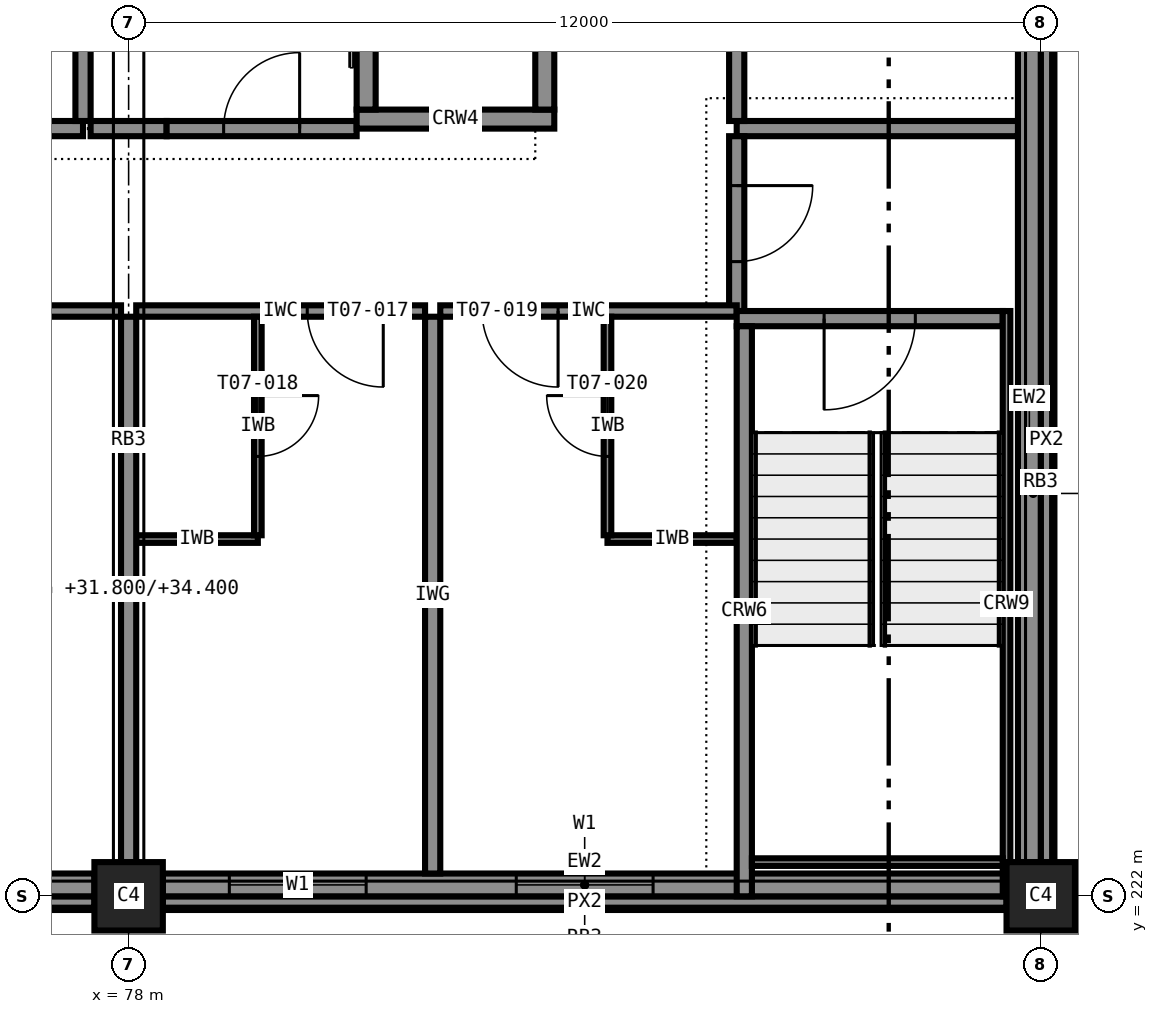
"""IFC4 building model, lengths in metres.
Left out: names, types, materials, properties, quantities, classifications, styles, units other than length and angle.
Written with IfcOpenShell. Run it as: python <this file> out.ifc"""

import sys

from ifc_helpers import new_model, si_unit, direction, frame, frame_2d, origin, origin_2d, place, context, subcontext, project, spatial, rectangle, extrude, element, fill, save


model = new_model("IFC4")
c1 = context("Model", 3, precision=1e-05, world=origin(), true_north=direction((0.0, 1.0)))
c2 = subcontext(c1, "Body", "Model", "MODEL_VIEW")
j1 = project(units=[si_unit("LENGTHUNIT", "METRE"), si_unit("PLANEANGLEUNIT", "RADIAN")], contexts=[c1])
p1 = place(None, origin())
s1 = spatial("IfcSite", under=j1, at=p1, CompositionType="ELEMENT")
p2 = place(p1, origin())
s2 = spatial("IfcBuilding", under=s1, at=p2, CompositionType="ELEMENT")
p3 = place(p2, frame((0.0, 0.0, 31.8)))
s3 = spatial("IfcBuildingStorey", under=s2, at=p3, CompositionType="ELEMENT", Elevation=31.8)
for number, where, z_axis, x_axis in (
    (1, (78.0, 222.0, 0.0), (0.0, 0.0, 1.0), (1.0, 0.0, 0.0)),
    (2, (90.0, 222.0, 0.0), (0.0, 0.0, 1.0), (1.0, 0.0, 0.0)),
):
    element("IfcColumn", number, at=place(p3, frame(where, z_axis=z_axis, x_axis=x_axis)), inside=s3, PredefinedType="COLUMN", context=c2, shape_type="SweptSolid", body=[
        extrude(rectangle(XDim=0.9, YDim=0.9, at=origin_2d()), origin(), (0.0, 0.0, 1.0), 3.6),
    ])
p4 = place(p3, frame((81.0, 232.225, 0.0), z_axis=(0.0, 0.0, 1.0), x_axis=(1.0, 0.0, 0.0)))
e3 = element("IfcWall", 3, at=p4, inside=s3, PredefinedType="SHEAR", context=c2, shape_type="SweptSolid", body=[
    extrude(rectangle(XDim=2.6, YDim=0.25, at=frame_2d((1.3, 0.0))), origin(), (0.0, 0.0, 1.0), 3.6),
])
p5 = place(p3, frame((81.125, 232.35, 0.0), z_axis=(0.0, 0.0, 1.0), x_axis=(0.0, 1.0, 0.0)))
e4 = element("IfcWall", 4, at=p5, inside=s3, PredefinedType="SHEAR", context=c2, shape_type="SweptSolid", body=[
    extrude(rectangle(XDim=3.3, YDim=0.25, at=frame_2d((1.65, 0.0))), origin(), (0.0, 0.0, 1.0), 3.6),
])
p6 = place(p5, frame((1.1, 0.0, 0.0)))
e5 = element("IfcOpeningElement", 5, at=p6, cuts=e4, PredefinedType="OPENING", context=c2, shape_type="SweptSolid", body=[
    extrude(rectangle(XDim=1.1, YDim=2.1, at=frame_2d((0.55, 1.05))), frame((0.0, 0.135, 0.0), z_axis=(0.0, -1.0, 0.0), x_axis=(1.0, 0.0, 0.0)), (0.0, 0.0, 1.0), 0.27),
])
p7 = place(p3, frame((83.475, 232.35, 0.0), z_axis=(0.0, 0.0, 1.0), x_axis=(0.0, 1.0, 0.0)))
e6 = element("IfcWall", 6, at=p7, inside=s3, PredefinedType="SHEAR", context=c2, shape_type="SweptSolid", body=[
    extrude(rectangle(XDim=3.3, YDim=0.25, at=frame_2d((1.65, 0.0))), origin(), (0.0, 0.0, 1.0), 3.6),
])
p8 = place(p3, frame((89.5, 229.6, 0.0), z_axis=(0.0, 0.0, 1.0), x_axis=(-1.0, 0.0, 0.0)))
e7 = element("IfcWall", 7, at=p8, inside=s3, PredefinedType="SHEAR", context=c2, shape_type="SweptSolid", body=[
    extrude(rectangle(XDim=3.5, YDim=0.2, at=frame_2d((1.75, 0.0))), origin(), (0.0, 0.0, 1.0), 3.6),
])
p9 = place(p8, frame((1.15, 0.0, 0.0)))
e8 = element("IfcOpeningElement", 8, at=p9, cuts=e7, PredefinedType="OPENING", context=c2, shape_type="SweptSolid", body=[
    extrude(rectangle(XDim=1.2, YDim=2.1, at=frame_2d((0.6, 1.05))), frame((0.0, 0.11, 0.0), z_axis=(0.0, -1.0, 0.0), x_axis=(1.0, 0.0, 0.0)), (0.0, 0.0, 1.0), 0.22),
])
p10 = place(p3, frame((86.1, 222.0, 0.0), z_axis=(0.0, 0.0, 1.0), x_axis=(0.0, 1.0, 0.0)))
e9 = element("IfcWall", 9, at=p10, inside=s3, PredefinedType="SHEAR", context=c2, shape_type="SweptSolid", body=[
    extrude(rectangle(XDim=7.5, YDim=0.2, at=frame_2d((3.75, 0.0))), origin(), (0.0, 0.0, 1.0), 3.6),
])
p11 = place(p3, frame((89.55, 229.7, 0.0), z_axis=(0.0, 0.0, 1.0), x_axis=(0.0, -1.0, 0.0)))
e10 = element("IfcWall", 10, at=p11, inside=s3, PredefinedType="SHEAR", context=c2, shape_type="SweptSolid", body=[
    extrude(rectangle(XDim=7.7, YDim=0.1, at=frame_2d((3.85, 0.0))), origin(), (0.0, 0.0, 1.0), 3.4),
])
p12 = place(p3, frame((89.5, 222.45, 0.0), z_axis=(0.0, 0.0, 1.0), x_axis=(-1.0, 0.0, 0.0)))
e11 = element("IfcWall", 11, at=p12, inside=s3, PredefinedType="SHEAR", context=c2, shape_type="SweptSolid", body=[
    extrude(rectangle(XDim=3.3, YDim=0.1, at=frame_2d((1.65, 0.0))), origin(), (0.0, 0.0, 1.0), 3.4),
])
p13 = place(p3, frame((66.45, 222.15, 0.0), z_axis=(0.0, 0.0, 1.0), x_axis=(1.0, 0.0, 0.0)))
e12 = element("IfcWall", 12, at=p13, inside=s3, PredefinedType="STANDARD", context=c2, shape_type="SweptSolid", body=[
    extrude(rectangle(XDim=11.1, YDim=0.3, at=frame_2d((5.55, 0.0))), origin(), (0.0, 0.0, 1.0), 2.6),
])
p14 = place(p13, frame((0.95, 0.0, 0.85)))
e13 = element("IfcOpeningElement", 13, at=p14, cuts=e12, PredefinedType="OPENING", context=c2, shape_type="SweptSolid", body=[
    extrude(rectangle(XDim=1.8, YDim=1.75, at=frame_2d((0.9, 0.875))), frame((0.0, 0.16, 0.0), z_axis=(0.0, -1.0, 0.0), x_axis=(1.0, 0.0, 0.0)), (0.0, 0.0, 1.0), 0.32),
])
p15 = place(p13, frame((4.65, 0.0, 0.85)))
e14 = element("IfcOpeningElement", 14, at=p15, cuts=e12, PredefinedType="OPENING", context=c2, shape_type="SweptSolid", body=[
    extrude(rectangle(XDim=1.8, YDim=1.75, at=frame_2d((0.9, 0.875))), frame((0.0, 0.16, 0.0), z_axis=(0.0, -1.0, 0.0), x_axis=(1.0, 0.0, 0.0)), (0.0, 0.0, 1.0), 0.32),
])
p16 = place(p13, frame((8.35, 0.0, 0.85)))
e15 = element("IfcOpeningElement", 15, at=p16, cuts=e12, PredefinedType="OPENING", context=c2, shape_type="SweptSolid", body=[
    extrude(rectangle(XDim=1.8, YDim=1.75, at=frame_2d((0.9, 0.875))), frame((0.0, 0.16, 0.0), z_axis=(0.0, -1.0, 0.0), x_axis=(1.0, 0.0, 0.0)), (0.0, 0.0, 1.0), 0.32),
])
p17 = place(p3, frame((78.45, 222.15, 0.0), z_axis=(0.0, 0.0, 1.0), x_axis=(1.0, 0.0, 0.0)))
e16 = element("IfcWall", 16, at=p17, inside=s3, PredefinedType="STANDARD", context=c2, shape_type="SweptSolid", body=[
    extrude(rectangle(XDim=11.1, YDim=0.3, at=frame_2d((5.55, 0.0))), origin(), (0.0, 0.0, 1.0), 2.6),
])
p18 = place(p17, frame((0.875, 0.0, 0.85)))
e17 = element("IfcOpeningElement", 17, at=p18, cuts=e16, PredefinedType="OPENING", context=c2, shape_type="SweptSolid", body=[
    extrude(rectangle(XDim=1.8, YDim=1.75, at=frame_2d((0.9, 0.875))), frame((0.0, 0.16, 0.0), z_axis=(0.0, -1.0, 0.0), x_axis=(1.0, 0.0, 0.0)), (0.0, 0.0, 1.0), 0.32),
])
p19 = place(p17, frame((4.65, 0.0, 0.85)))
e18 = element("IfcOpeningElement", 18, at=p19, cuts=e16, PredefinedType="OPENING", context=c2, shape_type="SweptSolid", body=[
    extrude(rectangle(XDim=1.8, YDim=1.75, at=frame_2d((0.9, 0.875))), frame((0.0, 0.16, 0.0), z_axis=(0.0, -1.0, 0.0), x_axis=(1.0, 0.0, 0.0)), (0.0, 0.0, 1.0), 0.32),
])
for number, where, z_axis, x_axis in (
    (19, (66.45, 221.925, 3.4), (0.0, 0.0, 1.0), (1.0, 0.0, 0.0)),
    (20, (78.45, 221.925, 3.4), (0.0, 0.0, 1.0), (1.0, 0.0, 0.0)),
):
    element("IfcWall", number, at=place(p3, frame(where, z_axis=z_axis, x_axis=x_axis)), inside=s3, PredefinedType="STANDARD", context=c2, shape_type="SweptSolid", body=[
        extrude(rectangle(XDim=11.1, YDim=0.15, at=frame_2d((5.55, 0.0))), origin(), (0.0, 0.0, 1.0), 0.2),
    ])
p20 = place(p3, frame((89.85, 222.45, 0.0), z_axis=(0.0, 0.0, 1.0), x_axis=(0.0, 1.0, 0.0)))
e21 = element("IfcWall", 21, at=p20, inside=s3, PredefinedType="STANDARD", context=c2, shape_type="SweptSolid", body=[
    extrude(rectangle(XDim=11.1, YDim=0.3, at=frame_2d((5.55, 0.0))), origin(), (0.0, 0.0, 1.0), 2.6),
])
p21 = place(p3, frame((90.075, 222.45, 3.4), z_axis=(0.0, 0.0, 1.0), x_axis=(0.0, 1.0, 0.0)))
e22 = element("IfcWall", 22, at=p21, inside=s3, PredefinedType="STANDARD", context=c2, shape_type="SweptSolid", body=[
    extrude(rectangle(XDim=11.1, YDim=0.15, at=frame_2d((5.55, 0.0))), origin(), (0.0, 0.0, 1.0), 0.2),
])
p22 = place(p3, frame((75.5, 232.1, 0.0), z_axis=(0.0, 0.0, 1.0), x_axis=(1.0, 0.0, 0.0)))
e23 = element("IfcWall", 23, at=p22, inside=s3, PredefinedType="PARTITIONING", context=c2, shape_type="SweptSolid", body=[
    extrude(rectangle(XDim=1.9, YDim=0.2, at=frame_2d((0.95, 0.0))), origin(), (0.0, 0.0, 1.0), 3.4),
])
p23 = place(p3, frame((77.5, 232.1, 0.0), z_axis=(0.0, 0.0, 1.0), x_axis=(1.0, 0.0, 0.0)))
e24 = element("IfcWall", 24, at=p23, inside=s3, PredefinedType="PARTITIONING", context=c2, shape_type="SweptSolid", body=[
    extrude(rectangle(XDim=1.0, YDim=0.2, at=frame_2d((0.5, 0.0))), origin(), (0.0, 0.0, 1.0), 3.4),
])
p24 = place(p3, frame((78.5, 232.1, 0.0), z_axis=(0.0, 0.0, 1.0), x_axis=(1.0, 0.0, 0.0)))
e25 = element("IfcWall", 25, at=p24, inside=s3, PredefinedType="PARTITIONING", context=c2, shape_type="SweptSolid", body=[
    extrude(rectangle(XDim=2.5, YDim=0.2, at=frame_2d((1.25, 0.0))), origin(), (0.0, 0.0, 1.0), 3.4),
])
p25 = place(p24, frame((0.75, 0.0, 0.0)))
e26 = element("IfcOpeningElement", 26, at=p25, cuts=e25, PredefinedType="OPENING", context=c2, shape_type="SweptSolid", body=[
    extrude(rectangle(XDim=1.0, YDim=2.1, at=frame_2d((0.5, 1.05))), frame((0.0, 0.11, 0.0), z_axis=(0.0, -1.0, 0.0), x_axis=(1.0, 0.0, 0.0)), (0.0, 0.0, 1.0), 0.22),
])
p26 = place(p3, frame((86.0, 232.1, 0.0), z_axis=(0.0, 0.0, 1.0), x_axis=(1.0, 0.0, 0.0)))
e27 = element("IfcWall", 27, at=p26, inside=s3, PredefinedType="PARTITIONING", context=c2, shape_type="SweptSolid", body=[
    extrude(rectangle(XDim=3.7, YDim=0.2, at=frame_2d((1.85, 0.0))), origin(), (0.0, 0.0, 1.0), 3.4),
])
p27 = place(p3, frame((77.4, 232.2, 0.0), z_axis=(0.0, 0.0, 1.0), x_axis=(0.0, 1.0, 0.0)))
e28 = element("IfcWall", 28, at=p27, inside=s3, PredefinedType="PARTITIONING", context=c2, shape_type="SweptSolid", body=[
    extrude(rectangle(XDim=3.6, YDim=0.2, at=frame_2d((1.8, 0.0))), origin(), (0.0, 0.0, 1.0), 3.4),
])
p28 = place(p3, frame((86.0, 235.8, 0.0), z_axis=(0.0, 0.0, 1.0), x_axis=(0.0, -1.0, 0.0)))
e29 = element("IfcWall", 29, at=p28, inside=s3, PredefinedType="PARTITIONING", context=c2, shape_type="SweptSolid", body=[
    extrude(rectangle(XDim=3.6, YDim=0.2, at=frame_2d((1.8, 0.0))), origin(), (0.0, 0.0, 1.0), 3.4),
])
p29 = place(p28, frame((1.35, 0.0, 0.0)))
e30 = element("IfcOpeningElement", 30, at=p29, cuts=e29, PredefinedType="OPENING", context=c2, shape_type="SweptSolid", body=[
    extrude(rectangle(XDim=0.9, YDim=2.1, at=frame_2d((0.45, 1.05))), frame((0.0, 0.11, 0.0), z_axis=(0.0, -1.0, 0.0), x_axis=(1.0, 0.0, 0.0)), (0.0, 0.0, 1.0), 0.22),
])
p30 = place(p3, frame((86.0, 232.0, 0.0), z_axis=(0.0, 0.0, 1.0), x_axis=(0.0, -1.0, 0.0)))
e31 = element("IfcWall", 31, at=p30, inside=s3, PredefinedType="PARTITIONING", context=c2, shape_type="SweptSolid", body=[
    extrude(rectangle(XDim=2.3, YDim=0.2, at=frame_2d((1.15, 0.0))), origin(), (0.0, 0.0, 1.0), 3.4),
])
p31 = place(p30, frame((0.65, 0.0, 0.0)))
e32 = element("IfcOpeningElement", 32, at=p31, cuts=e31, PredefinedType="OPENING", context=c2, shape_type="SweptSolid", body=[
    extrude(rectangle(XDim=1.0, YDim=2.1, at=frame_2d((0.5, 1.05))), frame((0.0, 0.11, 0.0), z_axis=(0.0, -1.0, 0.0), x_axis=(1.0, 0.0, 0.0)), (0.0, 0.0, 1.0), 0.22),
])
p32 = place(p3, frame((77.9, 229.7, 0.0), z_axis=(0.0, 0.0, 1.0), x_axis=(-1.0, 0.0, 0.0)))
e33 = element("IfcWall", 33, at=p32, inside=s3, PredefinedType="PARTITIONING", context=c2, shape_type="SweptSolid", body=[
    extrude(rectangle(XDim=11.8, YDim=0.15, at=frame_2d((5.9, 0.0))), origin(), (0.0, 0.0, 1.0), 3.4),
])
p33 = place(p32, frame((5.0, 0.0, 0.0)))
e34 = element("IfcOpeningElement", 34, at=p33, cuts=e33, PredefinedType="OPENING", context=c2, shape_type="SweptSolid", body=[
    extrude(rectangle(XDim=1.8, YDim=2.1, at=frame_2d((0.9, 1.05))), frame((0.0, 0.085, 0.0), z_axis=(0.0, -1.0, 0.0), x_axis=(1.0, 0.0, 0.0)), (0.0, 0.0, 1.0), 0.17),
])
p34 = place(p3, frame((81.9, 229.7, 0.0), z_axis=(0.0, 0.0, 1.0), x_axis=(-1.0, 0.0, 0.0)))
e35 = element("IfcWall", 35, at=p34, inside=s3, PredefinedType="PARTITIONING", context=c2, shape_type="SweptSolid", body=[
    extrude(rectangle(XDim=3.8, YDim=0.15, at=frame_2d((1.9, 0.0))), origin(), (0.0, 0.0, 1.0), 3.4),
])
p35 = place(p34, frame((0.55, 0.0, 0.0)))
e36 = element("IfcOpeningElement", 36, at=p35, cuts=e35, PredefinedType="OPENING", context=c2, shape_type="SweptSolid", body=[
    extrude(rectangle(XDim=1.0, YDim=2.1, at=frame_2d((0.5, 1.05))), frame((0.0, 0.085, 0.0), z_axis=(0.0, -1.0, 0.0), x_axis=(1.0, 0.0, 0.0)), (0.0, 0.0, 1.0), 0.17),
])
p36 = place(p3, frame((78.1, 226.7, 0.0), z_axis=(0.0, 0.0, 1.0), x_axis=(1.0, 0.0, 0.0)))
e37 = element("IfcWall", 37, at=p36, inside=s3, PredefinedType="PARTITIONING", context=c2, shape_type="SweptSolid", body=[
    extrude(rectangle(XDim=1.6, YDim=0.1, at=frame_2d((0.8, 0.0))), origin(), (0.0, 0.0, 1.0), 3.4),
])
p37 = place(p3, frame((79.7, 229.625, 0.0), z_axis=(0.0, 0.0, 1.0), x_axis=(0.0, -1.0, 0.0)))
e38 = element("IfcWall", 38, at=p37, inside=s3, PredefinedType="PARTITIONING", context=c2, shape_type="SweptSolid", body=[
    extrude(rectangle(XDim=2.875, YDim=0.1, at=frame_2d((1.438, 0.0))), origin(), (0.0, 0.0, 1.0), 3.4),
])
p38 = place(p37, frame((1.038, 0.0, 0.0)))
e39 = element("IfcOpeningElement", 39, at=p38, cuts=e38, PredefinedType="OPENING", context=c2, shape_type="SweptSolid", body=[
    extrude(rectangle(XDim=0.8, YDim=2.1, at=frame_2d((0.4, 1.05))), frame((0.0, 0.06, 0.0), z_axis=(0.0, -1.0, 0.0), x_axis=(1.0, 0.0, 0.0)), (0.0, 0.0, 1.0), 0.12),
])
p39 = place(p3, frame((86.0, 229.7, 0.0), z_axis=(0.0, 0.0, 1.0), x_axis=(-1.0, 0.0, 0.0)))
e40 = element("IfcWall", 40, at=p39, inside=s3, PredefinedType="PARTITIONING", context=c2, shape_type="SweptSolid", body=[
    extrude(rectangle(XDim=3.9, YDim=0.15, at=frame_2d((1.95, 0.0))), origin(), (0.0, 0.0, 1.0), 3.4),
])
p40 = place(p39, frame((2.35, 0.0, 0.0)))
e41 = element("IfcOpeningElement", 41, at=p40, cuts=e40, PredefinedType="OPENING", context=c2, shape_type="SweptSolid", body=[
    extrude(rectangle(XDim=1.0, YDim=2.1, at=frame_2d((0.5, 1.05))), frame((0.0, 0.085, 0.0), z_axis=(0.0, -1.0, 0.0), x_axis=(1.0, 0.0, 0.0)), (0.0, 0.0, 1.0), 0.17),
])
p41 = place(p3, frame((84.3, 226.7, 0.0), z_axis=(0.0, 0.0, 1.0), x_axis=(1.0, 0.0, 0.0)))
e42 = element("IfcWall", 42, at=p41, inside=s3, PredefinedType="PARTITIONING", context=c2, shape_type="SweptSolid", body=[
    extrude(rectangle(XDim=1.7, YDim=0.1, at=frame_2d((0.85, 0.0))), origin(), (0.0, 0.0, 1.0), 3.4),
])
p42 = place(p3, frame((84.3, 226.75, 0.0), z_axis=(0.0, 0.0, 1.0), x_axis=(0.0, 1.0, 0.0)))
e43 = element("IfcWall", 43, at=p42, inside=s3, PredefinedType="PARTITIONING", context=c2, shape_type="SweptSolid", body=[
    extrude(rectangle(XDim=2.875, YDim=0.1, at=frame_2d((1.438, 0.0))), origin(), (0.0, 0.0, 1.0), 3.4),
])
p43 = place(p42, frame((1.038, 0.0, 0.0)))
e44 = element("IfcOpeningElement", 44, at=p43, cuts=e43, PredefinedType="OPENING", context=c2, shape_type="SweptSolid", body=[
    extrude(rectangle(XDim=0.8, YDim=2.1, at=frame_2d((0.4, 1.05))), frame((0.0, 0.06, 0.0), z_axis=(0.0, -1.0, 0.0), x_axis=(1.0, 0.0, 0.0)), (0.0, 0.0, 1.0), 0.12),
])
p44 = place(p3, frame((78.0, 222.45, 0.0), z_axis=(0.0, 0.0, 1.0), x_axis=(0.0, 1.0, 0.0)))
e45 = element("IfcWall", 45, at=p44, inside=s3, PredefinedType="PARTITIONING", context=c2, shape_type="SweptSolid", body=[
    extrude(rectangle(XDim=7.175, YDim=0.2, at=frame_2d((3.587, 0.0))), origin(), (0.0, 0.0, 1.0), 2.6),
])
p45 = place(p3, frame((82.0, 222.3, 0.0), z_axis=(0.0, 0.0, 1.0), x_axis=(0.0, 1.0, 0.0)))
e46 = element("IfcWall", 46, at=p45, inside=s3, PredefinedType="PARTITIONING", context=c2, shape_type="SweptSolid", body=[
    extrude(rectangle(XDim=7.325, YDim=0.2, at=frame_2d((3.663, 0.0))), origin(), (0.0, 0.0, 1.0), 3.4),
])
p46 = place(p18, origin())
e47 = element("IfcWindow", 47, at=p46, inside=s3, PartitioningType="SINGLE_PANEL", PredefinedType="WINDOW", context=c2, shape_type="SweptSolid", body=[
    extrude(rectangle(XDim=1.8, YDim=1.75, at=frame_2d((0.9, 0.875))), frame((0.0, 0.03, 0.0), z_axis=(0.0, -1.0, 0.0), x_axis=(1.0, 0.0, 0.0)), (0.0, 0.0, 1.0), 0.06),
])
fill(e17, e47)
p47 = place(p19, origin())
e48 = element("IfcWindow", 48, at=p47, inside=s3, PartitioningType="SINGLE_PANEL", PredefinedType="WINDOW", context=c2, shape_type="SweptSolid", body=[
    extrude(rectangle(XDim=1.8, YDim=1.75, at=frame_2d((0.9, 0.875))), frame((0.0, 0.03, 0.0), z_axis=(0.0, -1.0, 0.0), x_axis=(1.0, 0.0, 0.0)), (0.0, 0.0, 1.0), 0.06),
])
fill(e18, e48)
p48 = place(p25, origin())
e49 = element("IfcDoor", 49, at=p48, inside=s3, OperationType="SINGLE_SWING_RIGHT", PredefinedType="DOOR", context=c2, shape_type="SweptSolid", body=[
    extrude(rectangle(XDim=1.0, YDim=2.1, at=frame_2d((0.5, 1.05))), frame((0.0, 0.025, 0.0), z_axis=(0.0, -1.0, 0.0), x_axis=(1.0, 0.0, 0.0)), (0.0, 0.0, 1.0), 0.05),
])
fill(e26, e49)
p49 = place(p31, origin())
e50 = element("IfcDoor", 50, at=p49, inside=s3, OperationType="SINGLE_SWING_LEFT", PredefinedType="DOOR", context=c2, shape_type="SweptSolid", body=[
    extrude(rectangle(XDim=1.0, YDim=2.1, at=frame_2d((0.5, 1.05))), frame((0.0, 0.025, 0.0), z_axis=(0.0, -1.0, 0.0), x_axis=(1.0, 0.0, 0.0)), (0.0, 0.0, 1.0), 0.05),
])
fill(e32, e50)
p50 = place(p35, origin())
e51 = element("IfcDoor", 51, at=p50, inside=s3, OperationType="SINGLE_SWING_LEFT", PredefinedType="DOOR", context=c2, shape_type="SweptSolid", body=[
    extrude(rectangle(XDim=1.0, YDim=2.1, at=frame_2d((0.5, 1.05))), frame((0.0, 0.025, 0.0), z_axis=(0.0, -1.0, 0.0), x_axis=(1.0, 0.0, 0.0)), (0.0, 0.0, 1.0), 0.05),
])
fill(e36, e51)
p51 = place(p38, origin())
e52 = element("IfcDoor", 52, at=p51, inside=s3, OperationType="SINGLE_SWING_LEFT", PredefinedType="DOOR", context=c2, shape_type="SweptSolid", body=[
    extrude(rectangle(XDim=0.8, YDim=2.1, at=frame_2d((0.4, 1.05))), frame((0.0, 0.025, 0.0), z_axis=(0.0, -1.0, 0.0), x_axis=(1.0, 0.0, 0.0)), (0.0, 0.0, 1.0), 0.05),
])
fill(e39, e52)
p52 = place(p40, origin())
e53 = element("IfcDoor", 53, at=p52, inside=s3, OperationType="SINGLE_SWING_LEFT", PredefinedType="DOOR", context=c2, shape_type="SweptSolid", body=[
    extrude(rectangle(XDim=1.0, YDim=2.1, at=frame_2d((0.5, 1.05))), frame((0.0, 0.025, 0.0), z_axis=(0.0, -1.0, 0.0), x_axis=(1.0, 0.0, 0.0)), (0.0, 0.0, 1.0), 0.05),
])
fill(e41, e53)
p53 = place(p43, origin())
e54 = element("IfcDoor", 54, at=p53, inside=s3, OperationType="SINGLE_SWING_RIGHT", PredefinedType="DOOR", context=c2, shape_type="SweptSolid", body=[
    extrude(rectangle(XDim=0.8, YDim=2.1, at=frame_2d((0.4, 1.05))), frame((0.0, 0.025, 0.0), z_axis=(0.0, -1.0, 0.0), x_axis=(1.0, 0.0, 0.0)), (0.0, 0.0, 1.0), 0.05),
])
fill(e44, e54)
p54 = place(p9, origin())
e55 = element("IfcDoor", 55, at=p54, inside=s3, OperationType="SINGLE_SWING_RIGHT", PredefinedType="DOOR", context=c2, shape_type="SweptSolid", body=[
    extrude(rectangle(XDim=1.2, YDim=2.1, at=frame_2d((0.6, 1.05))), frame((0.0, 0.025, 0.0), z_axis=(0.0, -1.0, 0.0), x_axis=(1.0, 0.0, 0.0)), (0.0, 0.0, 1.0), 0.05),
])
fill(e8, e55)
save(model, sys.argv[1])
